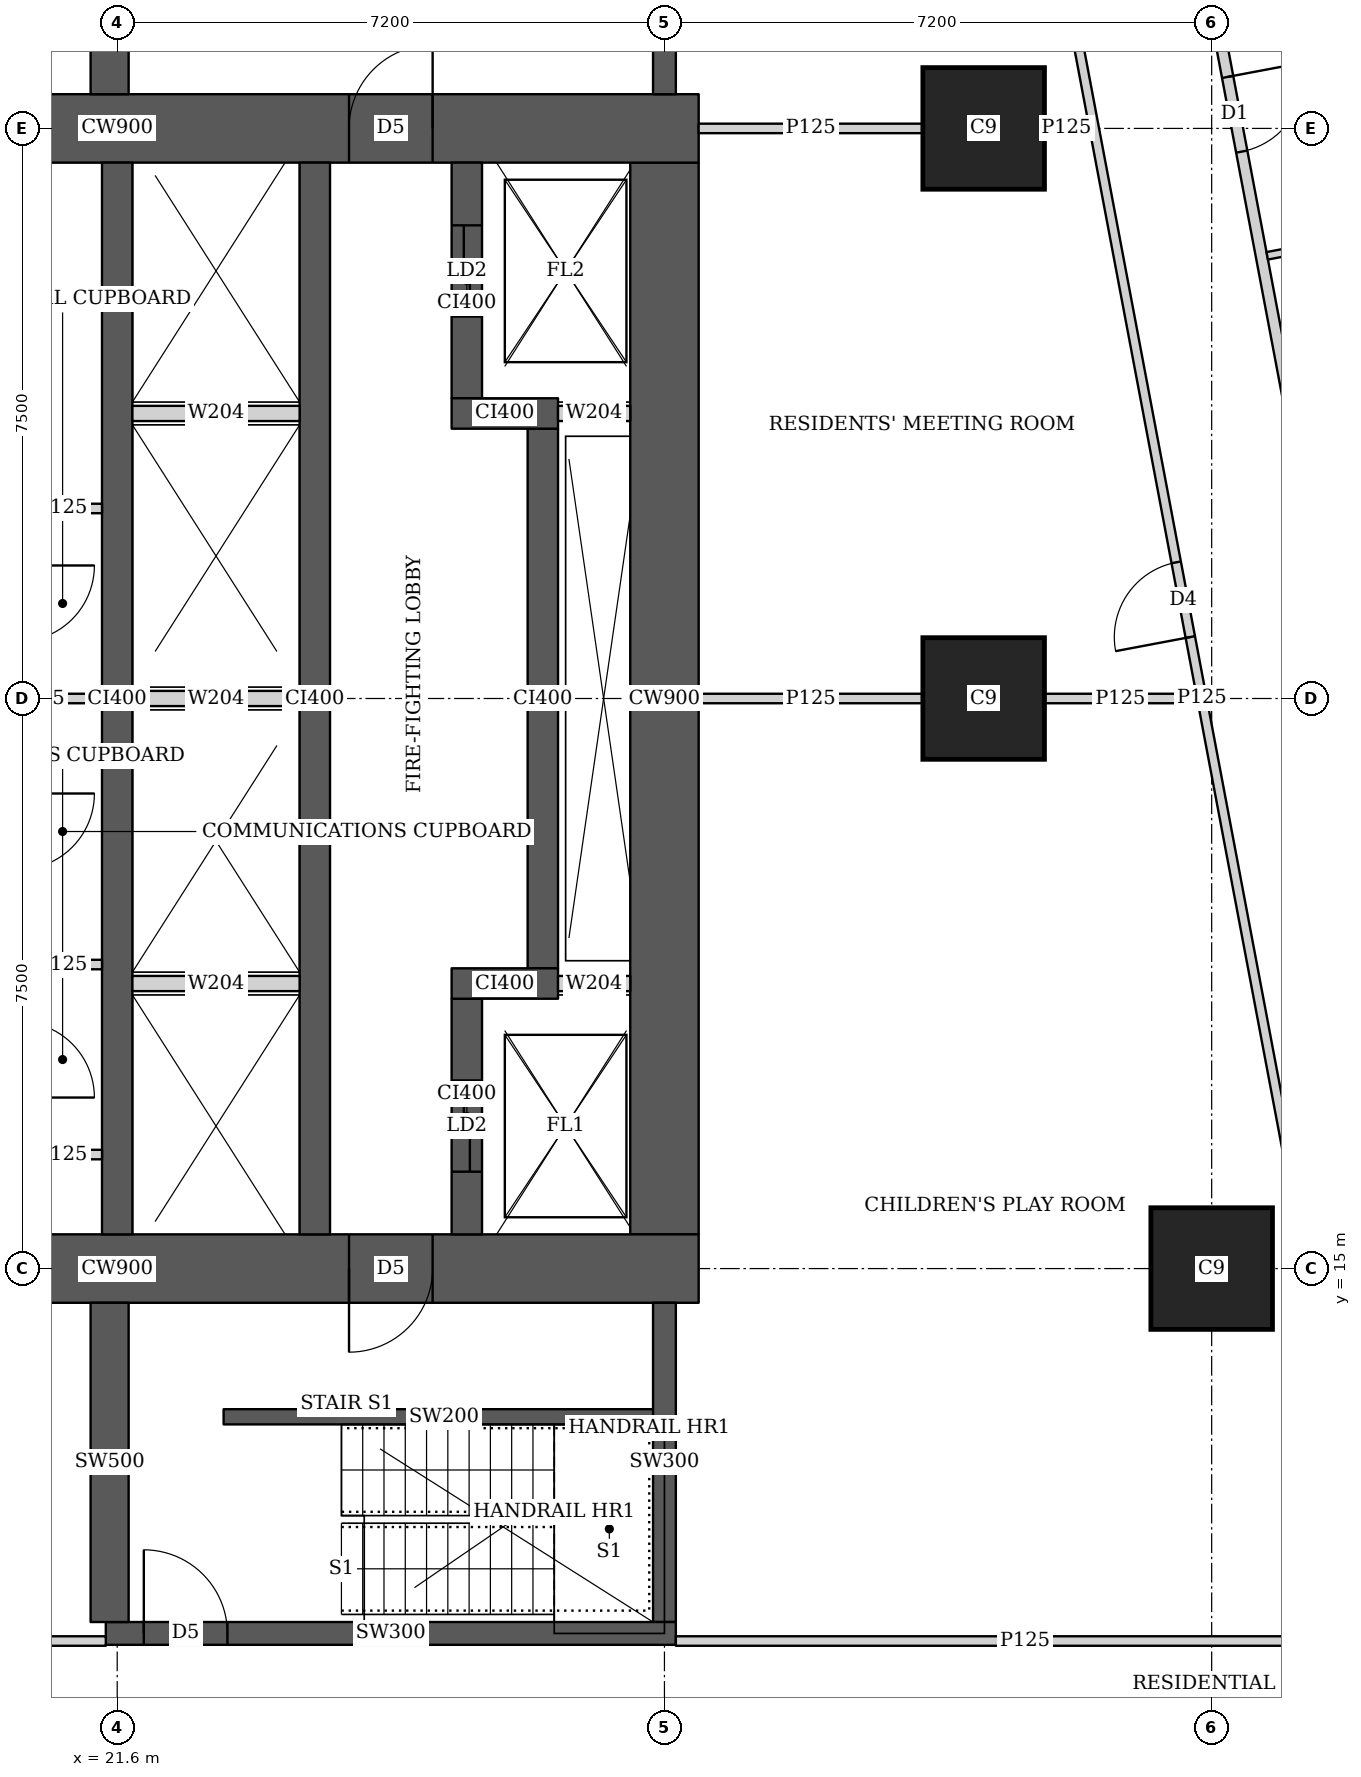
"""IFC4 building model, lengths in metres.
Left out: names, types, materials, properties, quantities, classifications, styles, units other than length and angle.
Written with IfcOpenShell. Run it as: python <this file> out.ifc"""

import sys

from ifc_helpers import new_model, si_unit, direction, frame, frame_2d, origin, origin_2d, place, context, subcontext, project, spatial, rectangle, extrude, element, fill, save


model = new_model("IFC4")
c1 = context("Model", 3, precision=1e-05, world=origin(), true_north=direction((0.0, 1.0)))
c2 = subcontext(c1, "Body", "Model", "MODEL_VIEW")
j1 = project(units=[si_unit("LENGTHUNIT", "METRE"), si_unit("PLANEANGLEUNIT", "RADIAN")], contexts=[c1])
p1 = place(None, origin())
s1 = spatial("IfcSite", under=j1, at=p1, CompositionType="ELEMENT")
p2 = place(p1, origin())
s2 = spatial("IfcBuilding", under=s1, at=p2, CompositionType="ELEMENT")
p3 = place(p2, frame((0.0, 0.0, 126.65)))
s3 = spatial("IfcBuildingStorey", under=s2, at=p3, CompositionType="ELEMENT", Elevation=126.65)
for number, where, z_axis, x_axis in (
    (1, (36.0, 15.0, 0.0), (0.0, 0.0, 1.0), (1.0, 0.0, 0.0)),
    (2, (33.0, 22.5, 0.0), (0.0, 0.0, 1.0), (1.0, 0.0, 0.0)),
    (3, (33.0, 30.0, 0.0), (0.0, 0.0, 1.0), (1.0, 0.0, 0.0)),
):
    element("IfcColumn", number, at=place(p3, frame(where, z_axis=z_axis, x_axis=x_axis)), inside=s3, PredefinedType="COLUMN", context=c2, shape_type="SweptSolid", body=[
        extrude(rectangle(XDim=1.6, YDim=1.6, at=origin_2d()), origin(), (0.0, 0.0, 1.0), 3.75),
    ])
p4 = place(p3, frame((13.95, 15.0, 0.0), z_axis=(0.0, 0.0, 1.0), x_axis=(1.0, 0.0, 0.0)))
e4 = element("IfcWall", 4, at=p4, inside=s3, PredefinedType="SHEAR", context=c2, shape_type="SweptSolid", body=[
    extrude(rectangle(XDim=15.3, YDim=0.9, at=frame_2d((7.65, 0.0))), origin(), (0.0, 0.0, 1.0), 3.75),
])
p5 = place(p4, frame((4.45, 0.0, 0.0)))
e5 = element("IfcOpeningElement", 5, at=p5, cuts=e4, PredefinedType="OPENING", context=c2, shape_type="SweptSolid", body=[
    extrude(rectangle(XDim=1.8, YDim=2.1, at=frame_2d((0.9, 1.05))), frame((0.0, 0.46, 0.0), z_axis=(0.0, -1.0, 0.0), x_axis=(1.0, 0.0, 0.0)), (0.0, 0.0, 1.0), 0.92),
])
p6 = place(p4, frame((10.7, 0.0, 0.0)))
e6 = element("IfcOpeningElement", 6, at=p6, cuts=e4, PredefinedType="OPENING", context=c2, shape_type="SweptSolid", body=[
    extrude(rectangle(XDim=1.1, YDim=2.1, at=frame_2d((0.55, 1.05))), frame((0.0, 0.46, 0.0), z_axis=(0.0, -1.0, 0.0), x_axis=(1.0, 0.0, 0.0)), (0.0, 0.0, 1.0), 0.92),
])
p7 = place(p3, frame((13.95, 30.0, 0.0), z_axis=(0.0, 0.0, 1.0), x_axis=(1.0, 0.0, 0.0)))
e7 = element("IfcWall", 7, at=p7, inside=s3, PredefinedType="SHEAR", context=c2, shape_type="SweptSolid", body=[
    extrude(rectangle(XDim=15.3, YDim=0.9, at=frame_2d((7.65, 0.0))), origin(), (0.0, 0.0, 1.0), 3.75),
])
p8 = place(p7, frame((4.45, 0.0, 0.0)))
e8 = element("IfcOpeningElement", 8, at=p8, cuts=e7, PredefinedType="OPENING", context=c2, shape_type="SweptSolid", body=[
    extrude(rectangle(XDim=1.8, YDim=2.1, at=frame_2d((0.9, 1.05))), frame((0.0, 0.46, 0.0), z_axis=(0.0, -1.0, 0.0), x_axis=(1.0, 0.0, 0.0)), (0.0, 0.0, 1.0), 0.92),
])
p9 = place(p7, frame((10.7, 0.0, 0.0)))
e9 = element("IfcOpeningElement", 9, at=p9, cuts=e7, PredefinedType="OPENING", context=c2, shape_type="SweptSolid", body=[
    extrude(rectangle(XDim=1.1, YDim=2.1, at=frame_2d((0.55, 1.05))), frame((0.0, 0.46, 0.0), z_axis=(0.0, -1.0, 0.0), x_axis=(1.0, 0.0, 0.0)), (0.0, 0.0, 1.0), 0.92),
])
p10 = place(p3, frame((28.8, 15.45, 0.0), z_axis=(0.0, 0.0, 1.0), x_axis=(0.0, 1.0, 0.0)))
e10 = element("IfcWall", 10, at=p10, inside=s3, PredefinedType="SHEAR", context=c2, shape_type="SweptSolid", body=[
    extrude(rectangle(XDim=14.1, YDim=0.9, at=frame_2d((7.05, 0.0))), origin(), (0.0, 0.0, 1.0), 3.75),
])
for number, where, z_axis, x_axis in (
    (11, (21.6, 15.45, 0.0), (0.0, 0.0, 1.0), (0.0, 1.0, 0.0)),
    (12, (24.2, 15.45, 0.0), (0.0, 0.0, 1.0), (0.0, 1.0, 0.0)),
):
    element("IfcWall", number, at=place(p3, frame(where, z_axis=z_axis, x_axis=x_axis)), inside=s3, PredefinedType="SHEAR", context=c2, shape_type="SweptSolid", body=[
        extrude(rectangle(XDim=14.1, YDim=0.4, at=frame_2d((7.05, 0.0))), origin(), (0.0, 0.0, 1.0), 3.75),
    ])
p11 = place(p3, frame((26.2, 15.45, 0.0), z_axis=(0.0, 0.0, 1.0), x_axis=(0.0, 1.0, 0.0)))
e13 = element("IfcWall", 13, at=p11, inside=s3, PredefinedType="SHEAR", context=c2, shape_type="SweptSolid", body=[
    extrude(rectangle(XDim=3.1, YDim=0.4, at=frame_2d((1.55, 0.0))), origin(), (0.0, 0.0, 1.0), 3.75),
])
p12 = place(p11, frame((0.825, 0.0, 0.0)))
e14 = element("IfcOpeningElement", 14, at=p12, cuts=e13, PredefinedType="OPENING", context=c2, shape_type="SweptSolid", body=[
    extrude(rectangle(XDim=1.2, YDim=2.1, at=frame_2d((0.6, 1.05))), frame((0.0, 0.21, 0.0), z_axis=(0.0, -1.0, 0.0), x_axis=(1.0, 0.0, 0.0)), (0.0, 0.0, 1.0), 0.42),
])
p13 = place(p3, frame((26.0, 18.75, 0.0), z_axis=(0.0, 0.0, 1.0), x_axis=(1.0, 0.0, 0.0)))
e15 = element("IfcWall", 15, at=p13, inside=s3, PredefinedType="SHEAR", context=c2, shape_type="SweptSolid", body=[
    extrude(rectangle(XDim=1.4, YDim=0.4, at=frame_2d((0.7, 0.0))), origin(), (0.0, 0.0, 1.0), 3.75),
])
p14 = place(p3, frame((27.2, 18.95, 0.0), z_axis=(0.0, 0.0, 1.0), x_axis=(0.0, 1.0, 0.0)))
e16 = element("IfcWall", 16, at=p14, inside=s3, PredefinedType="SHEAR", context=c2, shape_type="SweptSolid", body=[
    extrude(rectangle(XDim=7.1, YDim=0.4, at=frame_2d((3.55, 0.0))), origin(), (0.0, 0.0, 1.0), 3.75),
])
p15 = place(p3, frame((26.0, 26.25, 0.0), z_axis=(0.0, 0.0, 1.0), x_axis=(1.0, 0.0, 0.0)))
e17 = element("IfcWall", 17, at=p15, inside=s3, PredefinedType="SHEAR", context=c2, shape_type="SweptSolid", body=[
    extrude(rectangle(XDim=1.4, YDim=0.4, at=frame_2d((0.7, 0.0))), origin(), (0.0, 0.0, 1.0), 3.75),
])
p16 = place(p3, frame((26.2, 26.45, 0.0), z_axis=(0.0, 0.0, 1.0), x_axis=(0.0, 1.0, 0.0)))
e18 = element("IfcWall", 18, at=p16, inside=s3, PredefinedType="SHEAR", context=c2, shape_type="SweptSolid", body=[
    extrude(rectangle(XDim=3.1, YDim=0.4, at=frame_2d((1.55, 0.0))), origin(), (0.0, 0.0, 1.0), 3.75),
])
p17 = place(p16, frame((1.075, 0.0, 0.0)))
e19 = element("IfcOpeningElement", 19, at=p17, cuts=e18, PredefinedType="OPENING", context=c2, shape_type="SweptSolid", body=[
    extrude(rectangle(XDim=1.2, YDim=2.1, at=frame_2d((0.6, 1.05))), frame((0.0, 0.21, 0.0), z_axis=(0.0, -1.0, 0.0), x_axis=(1.0, 0.0, 0.0)), (0.0, 0.0, 1.0), 0.42),
])
p18 = place(p3, frame((21.45, 10.2, 0.0), z_axis=(0.0, 0.0, 1.0), x_axis=(1.0, 0.0, 0.0)))
e20 = element("IfcWall", 20, at=p18, inside=s3, PredefinedType="SHEAR", context=c2, shape_type="SweptSolid", body=[
    extrude(rectangle(XDim=7.5, YDim=0.3, at=frame_2d((3.75, 0.0))), origin(), (0.0, 0.0, 1.0), 3.75),
])
p19 = place(p18, frame((0.5, 0.0, 0.0)))
e21 = element("IfcOpeningElement", 21, at=p19, cuts=e20, PredefinedType="OPENING", context=c2, shape_type="SweptSolid", body=[
    extrude(rectangle(XDim=1.1, YDim=2.1, at=frame_2d((0.55, 1.05))), frame((0.0, 0.16, 0.0), z_axis=(0.0, -1.0, 0.0), x_axis=(1.0, 0.0, 0.0)), (0.0, 0.0, 1.0), 0.32),
])
p20 = place(p3, frame((21.5, 10.35, 0.0), z_axis=(0.0, 0.0, 1.0), x_axis=(0.0, 1.0, 0.0)))
e22 = element("IfcWall", 22, at=p20, inside=s3, PredefinedType="SHEAR", context=c2, shape_type="SweptSolid", body=[
    extrude(rectangle(XDim=4.2, YDim=0.5, at=frame_2d((2.1, 0.0))), origin(), (0.0, 0.0, 1.0), 3.75),
])
p21 = place(p3, frame((28.8, 10.35, 0.0), z_axis=(0.0, 0.0, 1.0), x_axis=(0.0, 1.0, 0.0)))
e23 = element("IfcWall", 23, at=p21, inside=s3, PredefinedType="SHEAR", context=c2, shape_type="SweptSolid", body=[
    extrude(rectangle(XDim=4.2, YDim=0.3, at=frame_2d((2.1, 0.0))), origin(), (0.0, 0.0, 1.0), 3.75),
])
p22 = place(p3, frame((21.5, 30.45, 0.0), z_axis=(0.0, 0.0, 1.0), x_axis=(0.0, 1.0, 0.0)))
e24 = element("IfcWall", 24, at=p22, inside=s3, PredefinedType="SHEAR", context=c2, shape_type="SweptSolid", body=[
    extrude(rectangle(XDim=4.2, YDim=0.5, at=frame_2d((2.1, 0.0))), origin(), (0.0, 0.0, 1.0), 3.75),
])
p23 = place(p3, frame((28.8, 30.45, 0.0), z_axis=(0.0, 0.0, 1.0), x_axis=(0.0, 1.0, 0.0)))
e25 = element("IfcWall", 25, at=p23, inside=s3, PredefinedType="SHEAR", context=c2, shape_type="SweptSolid", body=[
    extrude(rectangle(XDim=4.2, YDim=0.3, at=frame_2d((2.1, 0.0))), origin(), (0.0, 0.0, 1.0), 3.75),
])
p24 = place(p3, frame((33.896, 42.929, 0.0), z_axis=(0.0, 0.0, 1.0), x_axis=(0.1855961604, -0.982626106535, 0.0)))
e26 = element("IfcWall", 26, at=p24, inside=s3, PredefinedType="SOLIDWALL", context=c2, shape_type="SweptSolid", body=[
    extrude(rectangle(XDim=41.456, YDim=0.15, at=frame_2d((20.728, 0.0))), origin(), (0.0, 0.0, 1.0), 2.45),
])
p25 = place(p24, frame((7.893, 0.0, 0.0)))
e27 = element("IfcOpeningElement", 27, at=p25, cuts=e26, PredefinedType="OPENING", context=c2, shape_type="SweptSolid", body=[
    extrude(rectangle(XDim=1.0, YDim=2.1, at=frame_2d((0.5, 1.05))), frame((0.0, 0.085, 0.0), z_axis=(0.0, -1.0, 0.0), x_axis=(1.0, 0.0, 0.0)), (0.0, 0.0, 1.0), 0.17),
])
p26 = place(p24, frame((12.468, 0.0, 0.0)))
e28 = element("IfcOpeningElement", 28, at=p26, cuts=e26, PredefinedType="OPENING", context=c2, shape_type="SweptSolid", body=[
    extrude(rectangle(XDim=1.0, YDim=2.1, at=frame_2d((0.5, 1.05))), frame((0.0, 0.085, 0.0), z_axis=(0.0, -1.0, 0.0), x_axis=(1.0, 0.0, 0.0)), (0.0, 0.0, 1.0), 0.17),
])
p27 = place(p24, frame((20.101, 0.0, 0.0)))
e29 = element("IfcOpeningElement", 29, at=p27, cuts=e26, PredefinedType="OPENING", context=c2, shape_type="SweptSolid", body=[
    extrude(rectangle(XDim=1.0, YDim=2.1, at=frame_2d((0.5, 1.05))), frame((0.0, 0.085, 0.0), z_axis=(0.0, -1.0, 0.0), x_axis=(1.0, 0.0, 0.0)), (0.0, 0.0, 1.0), 0.17),
])
p28 = place(p24, frame((31.064, 0.0, 0.0)))
e30 = element("IfcOpeningElement", 30, at=p28, cuts=e26, PredefinedType="OPENING", context=c2, shape_type="SweptSolid", body=[
    extrude(rectangle(XDim=1.0, YDim=2.1, at=frame_2d((0.5, 1.05))), frame((0.0, 0.085, 0.0), z_axis=(0.0, -1.0, 0.0), x_axis=(1.0, 0.0, 0.0)), (0.0, 0.0, 1.0), 0.17),
])
p29 = place(p3, frame((39.948, 28.933, 0.0), z_axis=(0.0, 0.0, 1.0), x_axis=(-0.982542259571, -0.186039533857, 0.0)))
e31 = element("IfcWall", 31, at=p29, inside=s3, PredefinedType="PARTITIONING", context=c2, shape_type="SweptSolid", body=[
    extrude(rectangle(XDim=3.274, YDim=0.1, at=frame_2d((1.637, 0.0))), origin(), (0.0, 0.0, 1.0), 3.45),
])
p30 = place(p3, frame((10.163, 10.1, 0.0), z_axis=(0.0, 0.0, 1.0), x_axis=(1.0, 0.0, 0.0)))
e32 = element("IfcWall", 32, at=p30, inside=s3, PredefinedType="PARTITIONING", context=c2, shape_type="SweptSolid", body=[
    extrude(rectangle(XDim=11.287, YDim=0.125, at=frame_2d((5.644, 0.0))), origin(), (0.0, 0.0, 1.0), 3.45),
])
p31 = place(p30, frame((7.832, 0.0, 0.0)))
e33 = element("IfcOpeningElement", 33, at=p31, cuts=e32, PredefinedType="OPENING", context=c2, shape_type="SweptSolid", body=[
    extrude(rectangle(XDim=1.8, YDim=2.1, at=frame_2d((0.9, 1.05))), frame((0.0, 0.073, 0.0), z_axis=(0.0, -1.0, 0.0), x_axis=(1.0, 0.0, 0.0)), (0.0, 0.0, 1.0), 0.145),
])
p32 = place(p3, frame((28.95, 10.1, 0.0), z_axis=(0.0, 0.0, 1.0), x_axis=(1.0, 0.0, 0.0)))
e34 = element("IfcWall", 34, at=p32, inside=s3, PredefinedType="PARTITIONING", context=c2, shape_type="SweptSolid", body=[
    extrude(rectangle(XDim=9.188, YDim=0.125, at=frame_2d((4.594, 0.0))), origin(), (0.0, 0.0, 1.0), 3.45),
])
p33 = place(p3, frame((38.202, 10.163, 0.0), z_axis=(0.0, 0.0, 1.0), x_axis=(-0.185610321132, 0.982623431783, 0.0)))
e35 = element("IfcWall", 35, at=p33, inside=s3, PredefinedType="PARTITIONING", context=c2, shape_type="SweptSolid", body=[
    extrude(rectangle(XDim=25.111, YDim=0.125, at=frame_2d((12.556, 0.0))), origin(), (0.0, 0.0, 1.0), 2.45),
])
p34 = place(p33, frame((0.708, 0.0, 0.0)))
e36 = element("IfcOpeningElement", 36, at=p34, cuts=e35, PredefinedType="OPENING", context=c2, shape_type="SweptSolid", body=[
    extrude(rectangle(XDim=1.0, YDim=2.1, at=frame_2d((0.5, 1.05))), frame((0.0, 0.073, 0.0), z_axis=(0.0, -1.0, 0.0), x_axis=(1.0, 0.0, 0.0)), (0.0, 0.0, 1.0), 0.145),
])
p35 = place(p33, frame((13.378, 0.0, 0.0)))
e37 = element("IfcOpeningElement", 37, at=p35, cuts=e35, PredefinedType="OPENING", context=c2, shape_type="SweptSolid", body=[
    extrude(rectangle(XDim=1.0, YDim=2.1, at=frame_2d((0.5, 1.05))), frame((0.0, 0.073, 0.0), z_axis=(0.0, -1.0, 0.0), x_axis=(1.0, 0.0, 0.0)), (0.0, 0.0, 1.0), 0.145),
])
p36 = place(p33, frame((21.25, 0.0, 0.0)))
e38 = element("IfcOpeningElement", 38, at=p36, cuts=e35, PredefinedType="OPENING", context=c2, shape_type="SweptSolid", body=[
    extrude(rectangle(XDim=1.0, YDim=2.1, at=frame_2d((0.5, 1.05))), frame((0.0, 0.073, 0.0), z_axis=(0.0, -1.0, 0.0), x_axis=(1.0, 0.0, 0.0)), (0.0, 0.0, 1.0), 0.145),
])
p37 = place(p33, frame((23.453, 0.0, 0.0)))
e39 = element("IfcOpeningElement", 39, at=p37, cuts=e35, PredefinedType="OPENING", context=c2, shape_type="SweptSolid", body=[
    extrude(rectangle(XDim=1.0, YDim=2.1, at=frame_2d((0.5, 1.05))), frame((0.0, 0.073, 0.0), z_axis=(0.0, -1.0, 0.0), x_axis=(1.0, 0.0, 0.0)), (0.0, 0.0, 1.0), 0.145),
])
p38 = place(p3, frame((29.25, 22.5, 0.0), z_axis=(0.0, 0.0, 1.0), x_axis=(1.0, 0.0, 0.0)))
e40 = element("IfcWall", 40, at=p38, inside=s3, PredefinedType="PARTITIONING", context=c2, shape_type="SweptSolid", body=[
    extrude(rectangle(XDim=2.949, YDim=0.125, at=frame_2d((1.475, 0.0))), origin(), (0.0, 0.0, 1.0), 3.45),
])
p39 = place(p3, frame((33.801, 22.5, 0.0), z_axis=(0.0, 0.0, 1.0), x_axis=(1.0, 0.0, 0.0)))
e41 = element("IfcWall", 41, at=p39, inside=s3, PredefinedType="PARTITIONING", context=c2, shape_type="SweptSolid", body=[
    extrude(rectangle(XDim=1.995, YDim=0.125, at=frame_2d((0.998, 0.0))), origin(), (0.0, 0.0, 1.0), 2.45),
])
p40 = place(p3, frame((29.25, 30.0, 0.0), z_axis=(0.0, 0.0, 1.0), x_axis=(1.0, 0.0, 0.0)))
e42 = element("IfcWall", 42, at=p40, inside=s3, PredefinedType="PARTITIONING", context=c2, shape_type="SweptSolid", body=[
    extrude(rectangle(XDim=2.949, YDim=0.125, at=frame_2d((1.475, 0.0))), origin(), (0.0, 0.0, 1.0), 3.45),
])
p41 = place(p3, frame((33.801, 30.0, 0.0), z_axis=(0.0, 0.0, 1.0), x_axis=(1.0, 0.0, 0.0)))
e43 = element("IfcWall", 43, at=p41, inside=s3, PredefinedType="PARTITIONING", context=c2, shape_type="SweptSolid", body=[
    extrude(rectangle(XDim=0.578, YDim=0.125, at=frame_2d((0.289, 0.0))), origin(), (0.0, 0.0, 1.0), 2.45),
])
for number, where, z_axis, x_axis in (
    (44, (20.363, 16.5, 0.0), (0.0, 0.0, 1.0), (1.0, 0.0, 0.0)),
    (45, (20.363, 25.0, 0.0), (0.0, 0.0, 1.0), (1.0, 0.0, 0.0)),
    (46, (20.363, 19.0, 0.0), (0.0, 0.0, 1.0), (1.0, 0.0, 0.0)),
    (47, (20.363, 22.5, 0.0), (0.0, 0.0, 1.0), (1.0, 0.0, 0.0)),
):
    element("IfcWall", number, at=place(p3, frame(where, z_axis=z_axis, x_axis=x_axis)), inside=s3, PredefinedType="PARTITIONING", context=c2, shape_type="SweptSolid", body=[
        extrude(rectangle(XDim=1.037, YDim=0.125, at=frame_2d((0.519, 0.0))), origin(), (0.0, 0.0, 1.0), 3.45),
    ])
p42 = place(p3, frame((23.0, 13.05, 0.0), z_axis=(0.0, 0.0, 1.0), x_axis=(1.0, 0.0, 0.0)))
e48 = element("IfcWall", 48, at=p42, inside=s3, PredefinedType="SHEAR", context=c2, shape_type="SweptSolid", body=[
    extrude(rectangle(XDim=5.8, YDim=0.2, at=frame_2d((2.9, 0.0))), origin(), (0.0, 0.0, 1.0), 3.75),
])
for number, where, z_axis, x_axis in (
    (49, (21.8, 18.75, 0.0), (0.0, 0.0, 1.0), (1.0, 0.0, 0.0)),
    (50, (21.8, 22.5, 0.0), (0.0, 0.0, 1.0), (1.0, 0.0, 0.0)),
    (51, (21.8, 26.25, 0.0), (0.0, 0.0, 1.0), (1.0, 0.0, 0.0)),
):
    element("IfcWall", number, at=place(p3, frame(where, z_axis=z_axis, x_axis=x_axis)), inside=s3, PredefinedType="SOLIDWALL", context=c2, shape_type="SweptSolid", body=[
        extrude(rectangle(XDim=2.2, YDim=0.2, at=frame_2d((1.1, 0.0))), origin(), (0.0, 0.0, 1.0), 3.45),
    ])
for number, where, z_axis, x_axis in (
    (52, (27.4, 18.75, 0.0), (0.0, 0.0, 1.0), (1.0, 0.0, 0.0)),
    (53, (27.4, 26.25, 0.0), (0.0, 0.0, 1.0), (1.0, 0.0, 0.0)),
):
    element("IfcWall", number, at=place(p3, frame(where, z_axis=z_axis, x_axis=x_axis)), inside=s3, PredefinedType="SOLIDWALL", context=c2, shape_type="SweptSolid", body=[
        extrude(rectangle(XDim=0.95, YDim=0.2, at=frame_2d((0.475, 0.0))), origin(), (0.0, 0.0, 1.0), 3.45),
    ])
p43 = place(p26, origin())
e54 = element("IfcDoor", 54, at=p43, inside=s3, OperationType="SINGLE_SWING_LEFT", PredefinedType="DOOR", context=c2, shape_type="SweptSolid", body=[
    extrude(rectangle(XDim=1.0, YDim=2.1, at=frame_2d((0.5, 1.05))), frame((0.0, 0.025, 0.0), z_axis=(0.0, -1.0, 0.0), x_axis=(1.0, 0.0, 0.0)), (0.0, 0.0, 1.0), 0.05),
])
fill(e28, e54)
p44 = place(p35, origin())
e55 = element("IfcDoor", 55, at=p44, inside=s3, OperationType="SINGLE_SWING_LEFT", PredefinedType="DOOR", context=c2, shape_type="SweptSolid", body=[
    extrude(rectangle(XDim=1.0, YDim=2.1, at=frame_2d((0.5, 1.05))), frame((0.0, 0.025, 0.0), z_axis=(0.0, -1.0, 0.0), x_axis=(1.0, 0.0, 0.0)), (0.0, 0.0, 1.0), 0.05),
])
fill(e37, e55)
p45 = place(p6, origin())
e56 = element("IfcDoor", 56, at=p45, inside=s3, OperationType="SINGLE_SWING_RIGHT", PredefinedType="DOOR", context=c2, shape_type="SweptSolid", body=[
    extrude(rectangle(XDim=1.1, YDim=2.1, at=frame_2d((0.55, 1.05))), frame((0.0, 0.025, 0.0), z_axis=(0.0, -1.0, 0.0), x_axis=(1.0, 0.0, 0.0)), (0.0, 0.0, 1.0), 0.05),
])
fill(e6, e56)
p46 = place(p9, origin())
e57 = element("IfcDoor", 57, at=p46, inside=s3, OperationType="SINGLE_SWING_RIGHT", PredefinedType="DOOR", context=c2, shape_type="SweptSolid", body=[
    extrude(rectangle(XDim=1.1, YDim=2.1, at=frame_2d((0.55, 1.05))), frame((0.0, 0.025, 0.0), z_axis=(0.0, -1.0, 0.0), x_axis=(1.0, 0.0, 0.0)), (0.0, 0.0, 1.0), 0.05),
])
fill(e9, e57)
p47 = place(p12, origin())
e58 = element("IfcDoor", 58, at=p47, inside=s3, OperationType="DOUBLE_DOOR_SLIDING", PredefinedType="DOOR", context=c2, shape_type="SweptSolid", body=[
    extrude(rectangle(XDim=1.2, YDim=2.1, at=frame_2d((0.6, 1.05))), frame((0.0, 0.025, 0.0), z_axis=(0.0, -1.0, 0.0), x_axis=(1.0, 0.0, 0.0)), (0.0, 0.0, 1.0), 0.05),
])
fill(e14, e58)
p48 = place(p17, origin())
e59 = element("IfcDoor", 59, at=p48, inside=s3, OperationType="DOUBLE_DOOR_SLIDING", PredefinedType="DOOR", context=c2, shape_type="SweptSolid", body=[
    extrude(rectangle(XDim=1.2, YDim=2.1, at=frame_2d((0.6, 1.05))), frame((0.0, 0.025, 0.0), z_axis=(0.0, -1.0, 0.0), x_axis=(1.0, 0.0, 0.0)), (0.0, 0.0, 1.0), 0.05),
])
fill(e19, e59)
p49 = place(p19, origin())
e60 = element("IfcDoor", 60, at=p49, inside=s3, OperationType="SINGLE_SWING_LEFT", PredefinedType="DOOR", context=c2, shape_type="SweptSolid", body=[
    extrude(rectangle(XDim=1.1, YDim=2.1, at=frame_2d((0.55, 1.05))), frame((0.0, 0.025, 0.0), z_axis=(0.0, -1.0, 0.0), x_axis=(1.0, 0.0, 0.0)), (0.0, 0.0, 1.0), 0.05),
])
fill(e21, e60)
save(model, sys.argv[1])
